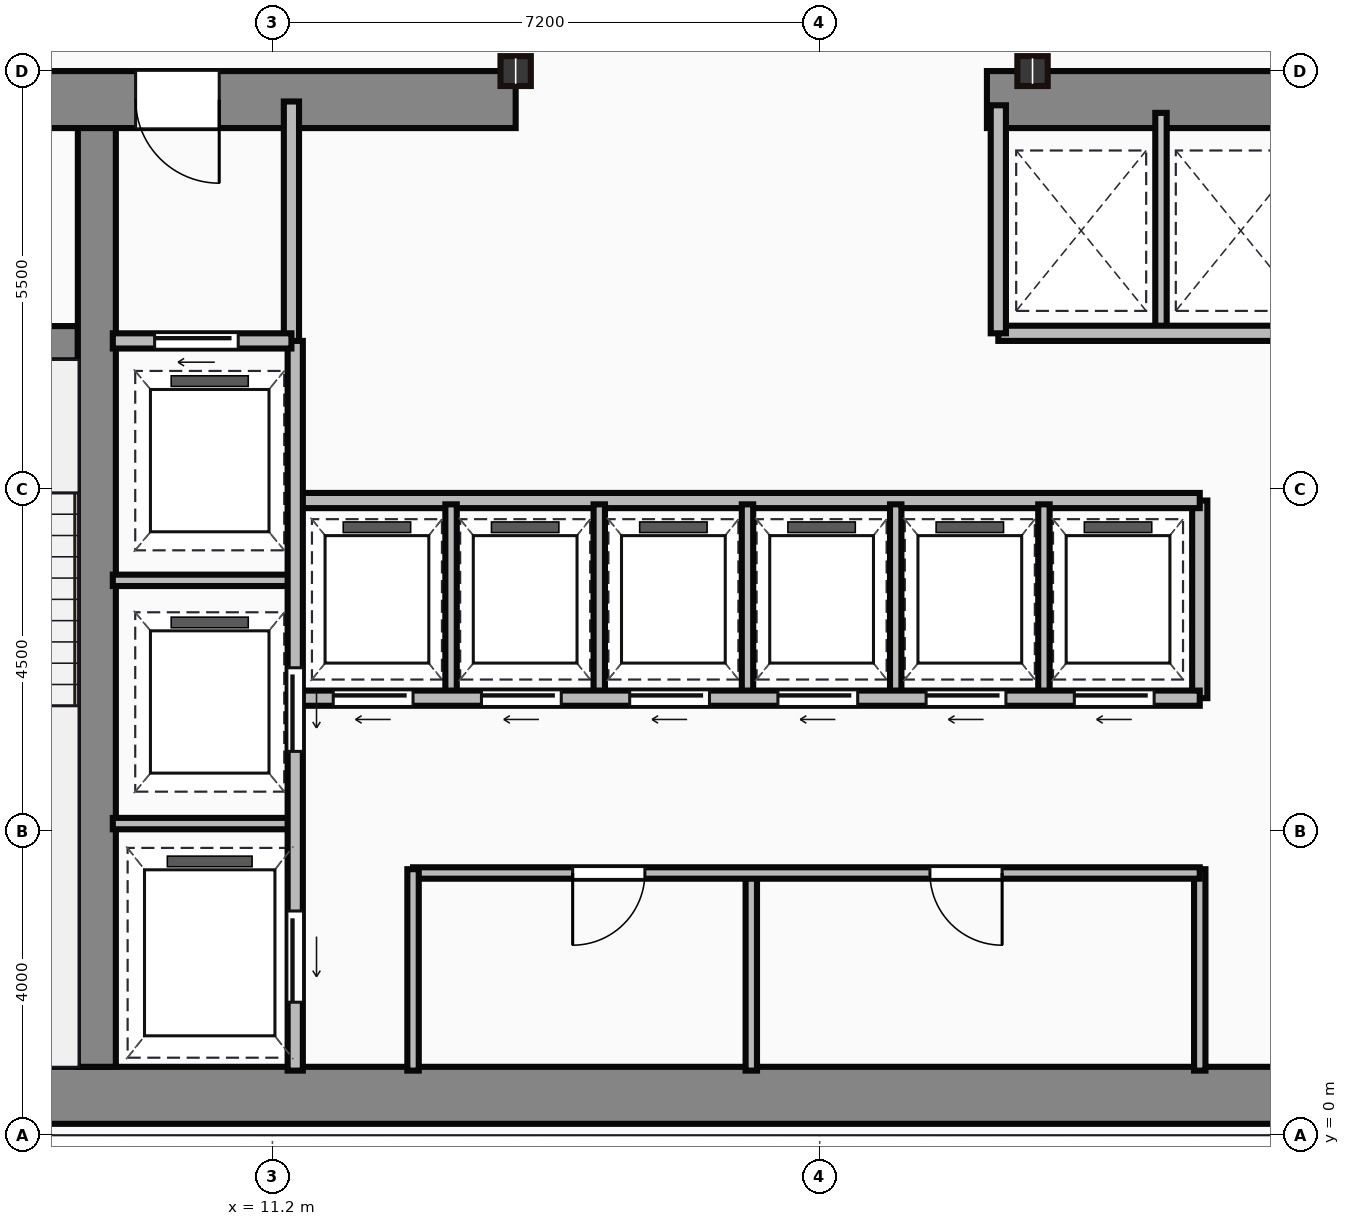
"""IFC4 building model, lengths in metres.
Left out: names, types, materials, properties, quantities, classifications, styles, units other than length and angle.
Written with IfcOpenShell. Run it as: python <this file> out.ifc"""

import sys

from ifc_helpers import new_model, si_unit, direction, frame, frame_2d, origin, origin_2d, place, context, subcontext, project, spatial, rectangle, i_section, extrude, source, transform, mapped, element, fill, save


model = new_model("IFC4")
c1 = context("Model", 3, precision=1e-05, world=origin(), true_north=direction((0.0, 1.0)))
c2 = subcontext(c1, "Body", "Model", "MODEL_VIEW")
j1 = project(units=[si_unit("LENGTHUNIT", "METRE"), si_unit("PLANEANGLEUNIT", "RADIAN")], contexts=[c1])
p1 = place(None, origin())
s1 = spatial("IfcSite", under=j1, at=p1, CompositionType="ELEMENT")
p2 = place(p1, origin())
s2 = spatial("IfcBuilding", under=s1, at=p2, CompositionType="ELEMENT")
p3 = place(p2, frame((0.0, 0.0, 125.15)))
s3 = spatial("IfcBuildingStorey", under=s2, at=p3, CompositionType="ELEMENT", Elevation=125.15)
m1 = source(origin(), c2, "Body", "SweptSolid", [
    extrude(rectangle(XDim=29.5, YDim=0.75, at=frame_2d((14.75, 0.0))), origin(), (0.0, 0.0, 1.0), 3.65),
])
p4 = place(p3, frame((4.5, 0.525, 0.0), z_axis=(0.0, 0.0, 1.0), x_axis=(1.0, 0.0, 0.0)))
e1 = element("IfcWall", 1, at=p4, inside=s3, PredefinedType="SHEAR", context=c2, shape_type="MappedRepresentation", body=[
    mapped(m1, transform((0.0, 0.0, 0.0))),
])
m2 = source(origin(), c2, "Body", "SweptSolid", [
    extrude(rectangle(XDim=9.1, YDim=0.75, at=frame_2d((4.55, 0.0))), origin(), (0.0, 0.0, 1.0), 3.65),
])
p5 = place(p3, frame((5.3, 13.625, 0.0), z_axis=(0.0, 0.0, 1.0), x_axis=(1.0, 0.0, 0.0)))
e2 = element("IfcWall", 2, at=p5, inside=s3, PredefinedType="SHEAR", context=c2, shape_type="MappedRepresentation", body=[
    mapped(m2, transform((0.0, 0.0, 0.0))),
])
p6 = place(p5, frame((4.1, 0.0, 0.0)))
e3 = element("IfcOpeningElement", 3, at=p6, cuts=e2, PredefinedType="OPENING", context=c2, shape_type="SweptSolid", body=[
    extrude(rectangle(XDim=1.1, YDim=2.15, at=frame_2d((0.55, 1.075))), frame((0.0, 0.385, 0.0), z_axis=(0.0, -1.0, 0.0), x_axis=(1.0, 0.0, 0.0)), (0.0, 0.0, 1.0), 0.77),
])
m3 = source(origin(), c2, "Body", "SweptSolid", [
    extrude(rectangle(XDim=12.6, YDim=0.75, at=frame_2d((6.3, 0.0))), origin(), (0.0, 0.0, 1.0), 3.65),
])
p7 = place(p3, frame((20.6, 13.625, 0.0), z_axis=(0.0, 0.0, 1.0), x_axis=(1.0, 0.0, 0.0)))
e4 = element("IfcWall", 4, at=p7, inside=s3, PredefinedType="SHEAR", context=c2, shape_type="MappedRepresentation", body=[
    mapped(m3, transform((0.0, 0.0, 0.0))),
])
p8 = place(p7, frame((9.25, 0.0, 0.0)))
e5 = element("IfcOpeningElement", 5, at=p8, cuts=e4, PredefinedType="OPENING", context=c2, shape_type="SweptSolid", body=[
    extrude(rectangle(XDim=1.1, YDim=2.15, at=frame_2d((0.55, 1.075))), frame((0.0, 0.385, 0.0), z_axis=(0.0, -1.0, 0.0), x_axis=(1.0, 0.0, 0.0)), (0.0, 0.0, 1.0), 0.77),
])
m4 = source(origin(), c2, "Body", "SweptSolid", [
    extrude(rectangle(XDim=12.35, YDim=0.5, at=frame_2d((6.175, 0.0))), origin(), (0.0, 0.0, 1.0), 3.65),
])
p9 = place(p3, frame((8.89, 0.9, 0.0), z_axis=(0.0, 0.0, 1.0), x_axis=(0.0, 1.0, 0.0)))
e6 = element("IfcWall", 6, at=p9, inside=s3, PredefinedType="SHEAR", context=c2, shape_type="MappedRepresentation", body=[
    mapped(m4, transform((0.0, 0.0, 0.0))),
])
m5 = source(origin(), c2, "Body", "SweptSolid", [
    extrude(rectangle(XDim=3.39, YDim=0.45, at=frame_2d((1.695, 0.0))), origin(), (0.0, 0.0, 1.0), 3.65),
])
p10 = place(p3, frame((5.25, 10.42, 0.0), z_axis=(0.0, 0.0, 1.0), x_axis=(1.0, 0.0, 0.0)))
e7 = element("IfcWall", 7, at=p10, inside=s3, PredefinedType="SHEAR", context=c2, shape_type="MappedRepresentation", body=[
    mapped(m5, transform((0.0, 0.0, 0.0))),
])
p11 = place(p10, frame((1.05, 0.0, 0.0)))
e8 = element("IfcOpeningElement", 8, at=p11, cuts=e7, PredefinedType="OPENING", context=c2, shape_type="SweptSolid", body=[
    extrude(rectangle(XDim=1.1, YDim=2.15, at=frame_2d((0.55, 1.075))), frame((0.0, 0.235, 0.0), z_axis=(0.0, -1.0, 0.0), x_axis=(1.0, 0.0, 0.0)), (0.0, 0.0, 1.0), 0.47),
])
m6 = source(origin(), c2, "Body", "SweptSolid", [
    extrude(i_section(OverallWidth=0.399, OverallDepth=0.393, WebThickness=0.023, FlangeThickness=0.037, at=origin_2d()), origin(), (0.0, 0.0, 1.0), 3.65),
])
for number, where, z_axis, x_axis in (
    (9, (14.4, 14.0, 0.0), (0.0, 0.0, 1.0), (1.0, 0.0, 0.0)),
    (10, (21.2, 14.0, 0.0), (0.0, 0.0, 1.0), (1.0, 0.0, 0.0)),
):
    element("IfcColumn", number, at=place(p3, frame(where, z_axis=z_axis, x_axis=x_axis)), inside=s3, PredefinedType="COLUMN", context=c2, shape_type="MappedRepresentation", body=[
        mapped(m6, transform((0.0, 0.0, 0.0))),
    ])
m7 = source(origin(), c2, "Body", "SweptSolid", [
    extrude(rectangle(XDim=3.18, YDim=0.2, at=frame_2d((1.59, 0.0))), origin(), (0.0, 0.0, 1.0), 3.4),
])
p12 = place(p3, frame((11.45, 10.42, 0.0), z_axis=(0.0, 0.0, 1.0), x_axis=(0.0, 1.0, 0.0)))
e11 = element("IfcWall", 11, at=p12, inside=s3, PredefinedType="PARTITIONING", context=c2, shape_type="MappedRepresentation", body=[
    mapped(m7, transform((0.0, 0.0, 0.0))),
])
m8 = source(origin(), c2, "Body", "SweptSolid", [
    extrude(rectangle(XDim=2.35, YDim=0.2, at=frame_2d((1.175, 0.0))), origin(), (0.0, 0.0, 1.0), 3.4),
])
p13 = place(p3, frame((9.1, 10.45, 0.0), z_axis=(0.0, 0.0, 1.0), x_axis=(1.0, 0.0, 0.0)))
e12 = element("IfcWall", 12, at=p13, inside=s3, PredefinedType="PARTITIONING", context=c2, shape_type="MappedRepresentation", body=[
    mapped(m8, transform((0.0, 0.0, 0.0))),
])
p14 = place(p13, frame((0.55, 0.0, 0.0)))
e13 = element("IfcOpeningElement", 13, at=p14, cuts=e12, PredefinedType="OPENING", context=c2, shape_type="SweptSolid", body=[
    extrude(rectangle(XDim=1.1, YDim=2.15, at=frame_2d((0.55, 1.075))), frame((0.0, 0.11, 0.0), z_axis=(0.0, -1.0, 0.0), x_axis=(1.0, 0.0, 0.0)), (0.0, 0.0, 1.0), 0.22),
])
m9 = source(origin(), c2, "Body", "SweptSolid", [
    extrude(rectangle(XDim=9.6, YDim=0.2, at=frame_2d((4.8, 0.0))), origin(), (0.0, 0.0, 1.0), 3.4),
])
p15 = place(p3, frame((11.5, 0.85, 0.0), z_axis=(0.0, 0.0, 1.0), x_axis=(0.0, 1.0, 0.0)))
e14 = element("IfcWall", 14, at=p15, inside=s3, PredefinedType="PARTITIONING", context=c2, shape_type="MappedRepresentation", body=[
    mapped(m9, transform((0.0, 0.0, 0.0))),
])
p16 = place(p15, frame((4.2, 0.0, 0.0)))
e15 = element("IfcOpeningElement", 15, at=p16, cuts=e14, PredefinedType="OPENING", context=c2, shape_type="SweptSolid", body=[
    extrude(rectangle(XDim=1.1, YDim=2.15, at=frame_2d((0.55, 1.075))), frame((0.0, 0.11, 0.0), z_axis=(0.0, -1.0, 0.0), x_axis=(1.0, 0.0, 0.0)), (0.0, 0.0, 1.0), 0.22),
])
p17 = place(p15, frame((0.9, 0.0, 0.0)))
e16 = element("IfcOpeningElement", 16, at=p17, cuts=e14, PredefinedType="OPENING", context=c2, shape_type="SweptSolid", body=[
    extrude(rectangle(XDim=1.2, YDim=2.15, at=frame_2d((0.6, 1.075))), frame((0.0, 0.11, 0.0), z_axis=(0.0, -1.0, 0.0), x_axis=(1.0, 0.0, 0.0)), (0.0, 0.0, 1.0), 0.22),
])
m10 = source(origin(), c2, "Body", "SweptSolid", [
    extrude(rectangle(XDim=2.4, YDim=0.15, at=frame_2d((1.2, 0.0))), origin(), (0.0, 0.0, 1.0), 3.4),
])
for number, where, z_axis, x_axis in (
    (17, (9.1, 4.1, 0.0), (0.0, 0.0, 1.0), (1.0, 0.0, 0.0)),
    (18, (9.1, 7.3, 0.0), (0.0, 0.0, 1.0), (1.0, 0.0, 0.0)),
):
    element("IfcWall", number, at=place(p3, frame(where, z_axis=z_axis, x_axis=x_axis)), inside=s3, PredefinedType="PARTITIONING", context=c2, shape_type="MappedRepresentation", body=[
        mapped(m10, transform((0.0, 0.0, 0.0))),
    ])
m11 = source(origin(), c2, "Body", "SweptSolid", [
    extrude(rectangle(XDim=2.65, YDim=0.15, at=frame_2d((1.325, 0.0))), origin(), (0.0, 0.0, 1.0), 3.4),
])
p18 = place(p3, frame((13.05, 0.85, 0.0), z_axis=(0.0, 0.0, 1.0), x_axis=(0.0, 1.0, 0.0)))
e19 = element("IfcWall", 19, at=p18, inside=s3, PredefinedType="PARTITIONING", context=c2, shape_type="MappedRepresentation", body=[
    mapped(m11, transform((0.0, 0.0, 0.0))),
])
m12 = source(origin(), c2, "Body", "SweptSolid", [
    extrude(rectangle(XDim=10.35, YDim=0.15, at=frame_2d((5.175, 0.0))), origin(), (0.0, 0.0, 1.0), 3.4),
])
p19 = place(p3, frame((13.05, 3.45, 0.0), z_axis=(0.0, 0.0, 1.0), x_axis=(1.0, 0.0, 0.0)))
e20 = element("IfcWall", 20, at=p19, inside=s3, PredefinedType="PARTITIONING", context=c2, shape_type="MappedRepresentation", body=[
    mapped(m12, transform((0.0, 0.0, 0.0))),
])
p20 = place(p19, frame((2.1, 0.0, 0.0)))
e21 = element("IfcOpeningElement", 21, at=p20, cuts=e20, PredefinedType="OPENING", context=c2, shape_type="SweptSolid", body=[
    extrude(rectangle(XDim=0.95, YDim=2.15, at=frame_2d((0.475, 1.075))), frame((0.0, 0.085, 0.0), z_axis=(0.0, -1.0, 0.0), x_axis=(1.0, 0.0, 0.0)), (0.0, 0.0, 1.0), 0.17),
])
p21 = place(p19, frame((6.8, 0.0, 0.0)))
e22 = element("IfcOpeningElement", 22, at=p21, cuts=e20, PredefinedType="OPENING", context=c2, shape_type="SweptSolid", body=[
    extrude(rectangle(XDim=0.95, YDim=2.15, at=frame_2d((0.475, 1.075))), frame((0.0, 0.085, 0.0), z_axis=(0.0, -1.0, 0.0), x_axis=(1.0, 0.0, 0.0)), (0.0, 0.0, 1.0), 0.17),
])
p22 = place(p3, frame((23.4, 0.85, 0.0), z_axis=(0.0, 0.0, 1.0), x_axis=(0.0, 1.0, 0.0)))
e23 = element("IfcWall", 23, at=p22, inside=s3, PredefinedType="PARTITIONING", context=c2, shape_type="MappedRepresentation", body=[
    mapped(m11, transform((0.0, 0.0, 0.0))),
])
m13 = source(origin(), c2, "Body", "SweptSolid", [
    extrude(rectangle(XDim=2.6, YDim=0.15, at=frame_2d((1.3, 0.0))), origin(), (0.0, 0.0, 1.0), 3.4),
])
p23 = place(p3, frame((17.5, 0.85, 0.0), z_axis=(0.0, 0.0, 1.0), x_axis=(0.0, 1.0, 0.0)))
e24 = element("IfcWall", 24, at=p23, inside=s3, PredefinedType="PARTITIONING", context=c2, shape_type="MappedRepresentation", body=[
    mapped(m13, transform((0.0, 0.0, 0.0))),
])
m14 = source(origin(), c2, "Body", "SweptSolid", [
    extrude(rectangle(XDim=11.85, YDim=0.2, at=frame_2d((5.925, 0.0))), origin(), (0.0, 0.0, 1.0), 3.4),
])
p24 = place(p3, frame((11.55, 5.75, 0.0), z_axis=(0.0, 0.0, 1.0), x_axis=(1.0, 0.0, 0.0)))
e25 = element("IfcWall", 25, at=p24, inside=s3, PredefinedType="PARTITIONING", context=c2, shape_type="MappedRepresentation", body=[
    mapped(m14, transform((0.0, 0.0, 0.0))),
])
p25 = place(p24, frame((0.45, 0.0, 0.0)))
e26 = element("IfcOpeningElement", 26, at=p25, cuts=e25, PredefinedType="OPENING", context=c2, shape_type="SweptSolid", body=[
    extrude(rectangle(XDim=1.05, YDim=2.15, at=frame_2d((0.525, 1.075))), frame((0.0, 0.11, 0.0), z_axis=(0.0, -1.0, 0.0), x_axis=(1.0, 0.0, 0.0)), (0.0, 0.0, 1.0), 0.22),
])
p26 = place(p24, frame((2.4, 0.0, 0.0)))
e27 = element("IfcOpeningElement", 27, at=p26, cuts=e25, PredefinedType="OPENING", context=c2, shape_type="SweptSolid", body=[
    extrude(rectangle(XDim=1.05, YDim=2.15, at=frame_2d((0.525, 1.075))), frame((0.0, 0.11, 0.0), z_axis=(0.0, -1.0, 0.0), x_axis=(1.0, 0.0, 0.0)), (0.0, 0.0, 1.0), 0.22),
])
p27 = place(p24, frame((4.35, 0.0, 0.0)))
e28 = element("IfcOpeningElement", 28, at=p27, cuts=e25, PredefinedType="OPENING", context=c2, shape_type="SweptSolid", body=[
    extrude(rectangle(XDim=1.05, YDim=2.15, at=frame_2d((0.525, 1.075))), frame((0.0, 0.11, 0.0), z_axis=(0.0, -1.0, 0.0), x_axis=(1.0, 0.0, 0.0)), (0.0, 0.0, 1.0), 0.22),
])
p28 = place(p24, frame((6.3, 0.0, 0.0)))
e29 = element("IfcOpeningElement", 29, at=p28, cuts=e25, PredefinedType="OPENING", context=c2, shape_type="SweptSolid", body=[
    extrude(rectangle(XDim=1.05, YDim=2.15, at=frame_2d((0.525, 1.075))), frame((0.0, 0.11, 0.0), z_axis=(0.0, -1.0, 0.0), x_axis=(1.0, 0.0, 0.0)), (0.0, 0.0, 1.0), 0.22),
])
p29 = place(p24, frame((8.25, 0.0, 0.0)))
e30 = element("IfcOpeningElement", 30, at=p29, cuts=e25, PredefinedType="OPENING", context=c2, shape_type="SweptSolid", body=[
    extrude(rectangle(XDim=1.05, YDim=2.15, at=frame_2d((0.525, 1.075))), frame((0.0, 0.11, 0.0), z_axis=(0.0, -1.0, 0.0), x_axis=(1.0, 0.0, 0.0)), (0.0, 0.0, 1.0), 0.22),
])
p30 = place(p24, frame((10.2, 0.0, 0.0)))
e31 = element("IfcOpeningElement", 31, at=p30, cuts=e25, PredefinedType="OPENING", context=c2, shape_type="SweptSolid", body=[
    extrude(rectangle(XDim=1.05, YDim=2.15, at=frame_2d((0.525, 1.075))), frame((0.0, 0.11, 0.0), z_axis=(0.0, -1.0, 0.0), x_axis=(1.0, 0.0, 0.0)), (0.0, 0.0, 1.0), 0.22),
])
p31 = place(p3, frame((11.55, 8.35, 0.0), z_axis=(0.0, 0.0, 1.0), x_axis=(1.0, 0.0, 0.0)))
e32 = element("IfcWall", 32, at=p31, inside=s3, PredefinedType="PARTITIONING", context=c2, shape_type="MappedRepresentation", body=[
    mapped(m14, transform((0.0, 0.0, 0.0))),
])
m15 = source(origin(), c2, "Body", "SweptSolid", [
    extrude(rectangle(XDim=2.6, YDim=0.2, at=frame_2d((1.3, 0.0))), origin(), (0.0, 0.0, 1.0), 3.4),
])
p32 = place(p3, frame((23.4, 5.75, 0.0), z_axis=(0.0, 0.0, 1.0), x_axis=(0.0, 1.0, 0.0)))
e33 = element("IfcWall", 33, at=p32, inside=s3, PredefinedType="PARTITIONING", context=c2, shape_type="MappedRepresentation", body=[
    mapped(m15, transform((0.0, 0.0, 0.0))),
])
m16 = source(origin(), c2, "Body", "SweptSolid", [
    extrude(rectangle(XDim=2.5, YDim=0.15, at=frame_2d((1.25, 0.0))), origin(), (0.0, 0.0, 1.0), 3.4),
])
for number, where, z_axis, x_axis in (
    (34, (13.55, 5.8, 0.0), (0.0, 0.0, 1.0), (0.0, 1.0, 0.0)),
    (35, (15.5, 5.8, 0.0), (0.0, 0.0, 1.0), (0.0, 1.0, 0.0)),
    (36, (17.45, 5.8, 0.0), (0.0, 0.0, 1.0), (0.0, 1.0, 0.0)),
    (37, (19.4, 5.8, 0.0), (0.0, 0.0, 1.0), (0.0, 1.0, 0.0)),
    (38, (21.35, 5.8, 0.0), (0.0, 0.0, 1.0), (0.0, 1.0, 0.0)),
):
    element("IfcWall", number, at=place(p3, frame(where, z_axis=z_axis, x_axis=x_axis)), inside=s3, PredefinedType="PARTITIONING", context=c2, shape_type="MappedRepresentation", body=[
        mapped(m16, transform((0.0, 0.0, 0.0))),
    ])
m17 = source(origin(), c2, "Body", "SweptSolid", [
    extrude(rectangle(XDim=8.8, YDim=0.2, at=frame_2d((4.4, 0.0))), origin(), (0.0, 0.0, 1.0), 3.4),
])
p33 = place(p3, frame((20.75, 10.55, 0.0), z_axis=(0.0, 0.0, 1.0), x_axis=(1.0, 0.0, 0.0)))
e39 = element("IfcWall", 39, at=p33, inside=s3, PredefinedType="PARTITIONING", context=c2, shape_type="MappedRepresentation", body=[
    mapped(m17, transform((0.0, 0.0, 0.0))),
])
m18 = source(origin(), c2, "Body", "SweptSolid", [
    extrude(rectangle(XDim=3.0, YDim=0.2, at=frame_2d((1.5, 0.0))), origin(), (0.0, 0.0, 1.0), 3.4),
])
p34 = place(p3, frame((20.75, 10.55, 0.0), z_axis=(0.0, 0.0, 1.0), x_axis=(0.0, 1.0, 0.0)))
e40 = element("IfcWall", 40, at=p34, inside=s3, PredefinedType="PARTITIONING", context=c2, shape_type="MappedRepresentation", body=[
    mapped(m18, transform((0.0, 0.0, 0.0))),
])
m19 = source(origin(), c2, "Body", "SweptSolid", [
    extrude(rectangle(XDim=2.85, YDim=0.15, at=frame_2d((1.425, 0.0))), origin(), (0.0, 0.0, 1.0), 3.4),
])
p35 = place(p3, frame((22.89, 10.6, 0.0), z_axis=(0.0, 0.0, 1.0), x_axis=(0.0, 1.0, 0.0)))
e41 = element("IfcWall", 41, at=p35, inside=s3, PredefinedType="PARTITIONING", context=c2, shape_type="MappedRepresentation", body=[
    mapped(m19, transform((0.0, 0.0, 0.0))),
])
m20 = source(origin(), c2, "Body", "SweptSolid", [
    extrude(rectangle(XDim=1.1, YDim=2.15, at=frame_2d((0.55, 1.075))), frame((0.0, 0.025, 0.0), z_axis=(0.0, -1.0, 0.0), x_axis=(1.0, 0.0, 0.0)), (0.0, 0.0, 1.0), 0.05),
])
p36 = place(p6, origin())
e42 = element("IfcDoor", 42, at=p36, inside=s3, OperationType="SINGLE_SWING_RIGHT", PredefinedType="DOOR", context=c2, shape_type="MappedRepresentation", body=[
    mapped(m20, transform((0.0, 0.0, 0.0))),
])
fill(e3, e42)
p37 = place(p14, origin())
e43 = element("IfcDoor", 43, at=p37, inside=s3, OperationType="SLIDING_TO_LEFT", PredefinedType="DOOR", context=c2, shape_type="MappedRepresentation", body=[
    mapped(m20, transform((0.0, 0.0, 0.0))),
])
fill(e13, e43)
p38 = place(p16, frame((1.1, 0.0, 0.0), z_axis=(0.0, 0.0, 1.0), x_axis=(-1.0, 0.0, 0.0)))
e44 = element("IfcDoor", 44, at=p38, inside=s3, OperationType="SLIDING_TO_LEFT", PredefinedType="DOOR", context=c2, shape_type="MappedRepresentation", body=[
    mapped(m20, transform((0.0, 0.0, 0.0))),
])
fill(e15, e44)
m21 = source(origin(), c2, "Body", "SweptSolid", [
    extrude(rectangle(XDim=1.2, YDim=2.15, at=frame_2d((0.6, 1.075))), frame((0.0, 0.025, 0.0), z_axis=(0.0, -1.0, 0.0), x_axis=(1.0, 0.0, 0.0)), (0.0, 0.0, 1.0), 0.05),
])
p39 = place(p17, frame((1.2, 0.0, 0.0), z_axis=(0.0, 0.0, 1.0), x_axis=(-1.0, 0.0, 0.0)))
e45 = element("IfcDoor", 45, at=p39, inside=s3, OperationType="SLIDING_TO_LEFT", PredefinedType="DOOR", context=c2, shape_type="MappedRepresentation", body=[
    mapped(m21, transform((0.0, 0.0, 0.0))),
])
fill(e16, e45)
m22 = source(origin(), c2, "Body", "SweptSolid", [
    extrude(rectangle(XDim=0.95, YDim=2.15, at=frame_2d((0.475, 1.075))), frame((0.0, 0.025, 0.0), z_axis=(0.0, -1.0, 0.0), x_axis=(1.0, 0.0, 0.0)), (0.0, 0.0, 1.0), 0.05),
])
p40 = place(p20, origin())
e46 = element("IfcDoor", 46, at=p40, inside=s3, OperationType="SINGLE_SWING_LEFT", PredefinedType="DOOR", context=c2, shape_type="MappedRepresentation", body=[
    mapped(m22, transform((0.0, 0.0, 0.0))),
])
fill(e21, e46)
p41 = place(p21, origin())
e47 = element("IfcDoor", 47, at=p41, inside=s3, OperationType="SINGLE_SWING_RIGHT", PredefinedType="DOOR", context=c2, shape_type="MappedRepresentation", body=[
    mapped(m22, transform((0.0, 0.0, 0.0))),
])
fill(e22, e47)
m23 = source(origin(), c2, "Body", "SweptSolid", [
    extrude(rectangle(XDim=1.05, YDim=2.15, at=frame_2d((0.525, 1.075))), frame((0.0, 0.025, 0.0), z_axis=(0.0, -1.0, 0.0), x_axis=(1.0, 0.0, 0.0)), (0.0, 0.0, 1.0), 0.05),
])
p42 = place(p25, frame((1.05, 0.0, 0.0), z_axis=(0.0, 0.0, 1.0), x_axis=(-1.0, 0.0, 0.0)))
e48 = element("IfcDoor", 48, at=p42, inside=s3, OperationType="SLIDING_TO_LEFT", PredefinedType="DOOR", context=c2, shape_type="MappedRepresentation", body=[
    mapped(m23, transform((0.0, 0.0, 0.0))),
])
fill(e26, e48)
p43 = place(p26, frame((1.05, 0.0, 0.0), z_axis=(0.0, 0.0, 1.0), x_axis=(-1.0, 0.0, 0.0)))
e49 = element("IfcDoor", 49, at=p43, inside=s3, OperationType="SLIDING_TO_LEFT", PredefinedType="DOOR", context=c2, shape_type="MappedRepresentation", body=[
    mapped(m23, transform((0.0, 0.0, 0.0))),
])
fill(e27, e49)
p44 = place(p27, frame((1.05, 0.0, 0.0), z_axis=(0.0, 0.0, 1.0), x_axis=(-1.0, 0.0, 0.0)))
e50 = element("IfcDoor", 50, at=p44, inside=s3, OperationType="SLIDING_TO_LEFT", PredefinedType="DOOR", context=c2, shape_type="MappedRepresentation", body=[
    mapped(m23, transform((0.0, 0.0, 0.0))),
])
fill(e28, e50)
p45 = place(p28, frame((1.05, 0.0, 0.0), z_axis=(0.0, 0.0, 1.0), x_axis=(-1.0, 0.0, 0.0)))
e51 = element("IfcDoor", 51, at=p45, inside=s3, OperationType="SLIDING_TO_LEFT", PredefinedType="DOOR", context=c2, shape_type="MappedRepresentation", body=[
    mapped(m23, transform((0.0, 0.0, 0.0))),
])
fill(e29, e51)
p46 = place(p29, frame((1.05, 0.0, 0.0), z_axis=(0.0, 0.0, 1.0), x_axis=(-1.0, 0.0, 0.0)))
e52 = element("IfcDoor", 52, at=p46, inside=s3, OperationType="SLIDING_TO_LEFT", PredefinedType="DOOR", context=c2, shape_type="MappedRepresentation", body=[
    mapped(m23, transform((0.0, 0.0, 0.0))),
])
fill(e30, e52)
p47 = place(p30, frame((1.05, 0.0, 0.0), z_axis=(0.0, 0.0, 1.0), x_axis=(-1.0, 0.0, 0.0)))
e53 = element("IfcDoor", 53, at=p47, inside=s3, OperationType="SLIDING_TO_LEFT", PredefinedType="DOOR", context=c2, shape_type="MappedRepresentation", body=[
    mapped(m23, transform((0.0, 0.0, 0.0))),
])
fill(e31, e53)
save(model, sys.argv[1])
